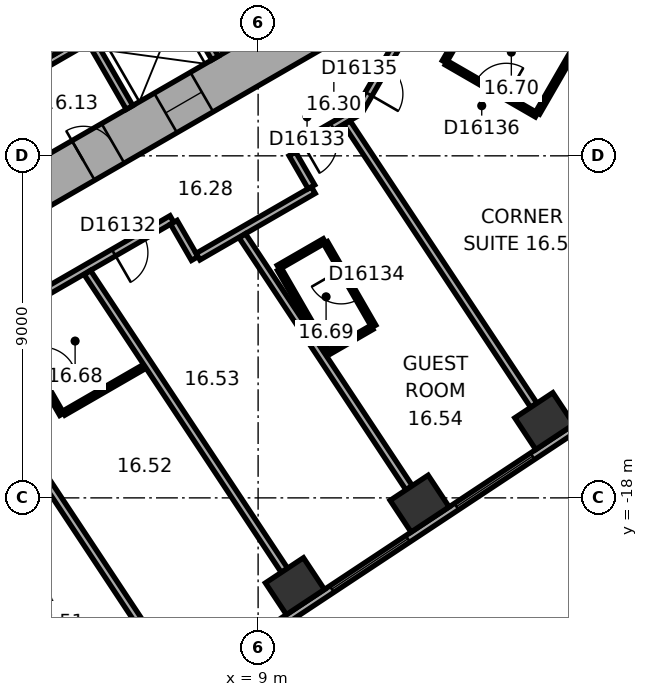
"""IFC4 building model, lengths in metres.
Left out: names, types, materials, properties, quantities, classifications, styles, units other than length and angle.
Written with IfcOpenShell. Run it as: python <this file> out.ifc"""

import sys

from ifc_helpers import new_model, si_unit, direction, frame, frame_2d, origin, origin_2d, place, context, subcontext, project, spatial, rectangle, extrude, element, fill, save


model = new_model("IFC4")
c1 = context("Model", 3, precision=1e-05, world=origin(), true_north=direction((0.0, 1.0)))
c2 = subcontext(c1, "Body", "Model", "MODEL_VIEW")
j1 = project(units=[si_unit("LENGTHUNIT", "METRE"), si_unit("PLANEANGLEUNIT", "RADIAN")], contexts=[c1])
p1 = place(None, origin())
s1 = spatial("IfcSite", under=j1, at=p1, CompositionType="ELEMENT")
p2 = place(p1, origin())
s2 = spatial("IfcBuilding", under=s1, at=p2, CompositionType="ELEMENT")
p3 = place(p2, frame((0.0, 0.0, 73.7)))
s3 = spatial("IfcBuildingStorey", under=s2, at=p3, CompositionType="ELEMENT", Elevation=73.7)
for number, where, z_axis, x_axis in (
    (1, (9.969, -20.324, 0.0), (0.0, 0.0, 1.0), (0.834, 0.552, 0.0)),
    (2, (13.25, -18.152, 0.0), (0.0, 0.0, 1.0), (0.834, 0.552, 0.0)),
    (3, (16.531, -15.981, 0.0), (0.0, 0.0, 1.0), (0.834, 0.552, 0.0)),
):
    element("IfcColumn", number, at=place(p3, frame(where, z_axis=z_axis, x_axis=x_axis)), inside=s3, PredefinedType="COLUMN", context=c2, shape_type="SweptSolid", body=[
        extrude(rectangle(XDim=1.2, YDim=1.0, at=origin_2d()), origin(), (0.0, 0.0, 1.0), 3.3),
    ])
p4 = place(p3, frame((-0.3, -11.836, 0.0), z_axis=(0.0, 0.0, 1.0), x_axis=(0.866021384402, 0.500006961711, 0.0)))
e4 = element("IfcWall", 4, at=p4, inside=s3, PredefinedType="SHEAR", context=c2, shape_type="SweptSolid", body=[
    extrude(rectangle(XDim=12.355, YDim=1.2, at=frame_2d((6.178, 0.0))), origin(), (0.0, 0.0, 1.0), 3.3),
])
p5 = place(p4, frame((2.828, 0.0, 0.0)))
e5 = element("IfcOpeningElement", 5, at=p5, cuts=e4, PredefinedType="OPENING", context=c2, shape_type="SweptSolid", body=[
    extrude(rectangle(XDim=0.9, YDim=2.1, at=frame_2d((0.45, 1.05))), frame((0.0, 0.61, 0.0), z_axis=(0.0, -1.0, 0.0), x_axis=(1.0, 0.0, 0.0)), (0.0, 0.0, 1.0), 1.22),
])
p6 = place(p4, frame((5.428, 0.0, 0.0)))
e6 = element("IfcOpeningElement", 6, at=p6, cuts=e4, PredefinedType="OPENING", context=c2, shape_type="SweptSolid", body=[
    extrude(rectangle(XDim=0.9, YDim=2.1, at=frame_2d((0.45, 1.05))), frame((0.0, 0.61, 0.0), z_axis=(0.0, -1.0, 0.0), x_axis=(1.0, 0.0, 0.0)), (0.0, 0.0, 1.0), 1.22),
])
p7 = place(p4, frame((7.928, 0.0, 0.0)))
e7 = element("IfcOpeningElement", 7, at=p7, cuts=e4, PredefinedType="OPENING", context=c2, shape_type="SweptSolid", body=[
    extrude(rectangle(XDim=1.1, YDim=2.1, at=frame_2d((0.55, 1.05))), frame((0.0, 0.61, 0.0), z_axis=(0.0, -1.0, 0.0), x_axis=(1.0, 0.0, 0.0)), (0.0, 0.0, 1.0), 1.22),
])
p8 = place(p3, frame((3.083, -25.601, 0.0), z_axis=(0.0, 0.0, 1.0), x_axis=(0.833884295743, 0.551939291329, 0.0)))
e8 = element("IfcWall", 8, at=p8, inside=s3, PredefinedType="STANDARD", context=c2, shape_type="SweptSolid", body=[
    extrude(rectangle(XDim=21.246, YDim=0.2, at=frame_2d((10.623, 0.0))), origin(), (0.0, 0.0, 1.0), 3.3),
])
p9 = place(p8, frame((1.553, 0.0, 0.8)))
e9 = element("IfcOpeningElement", 9, at=p9, cuts=e8, PredefinedType="OPENING", context=c2, shape_type="SweptSolid", body=[
    extrude(rectangle(XDim=2.4, YDim=1.7, at=frame_2d((1.2, 0.85))), frame((0.0, 0.11, 0.0), z_axis=(0.0, -1.0, 0.0), x_axis=(1.0, 0.0, 0.0)), (0.0, 0.0, 1.0), 0.22),
])
p10 = place(p8, frame((5.488, 0.0, 0.8)))
e10 = element("IfcOpeningElement", 10, at=p10, cuts=e8, PredefinedType="OPENING", context=c2, shape_type="SweptSolid", body=[
    extrude(rectangle(XDim=2.4, YDim=1.7, at=frame_2d((1.2, 0.85))), frame((0.0, 0.11, 0.0), z_axis=(0.0, -1.0, 0.0), x_axis=(1.0, 0.0, 0.0)), (0.0, 0.0, 1.0), 0.22),
])
p11 = place(p8, frame((9.422, 0.0, 0.8)))
e11 = element("IfcOpeningElement", 11, at=p11, cuts=e8, PredefinedType="OPENING", context=c2, shape_type="SweptSolid", body=[
    extrude(rectangle(XDim=2.4, YDim=1.7, at=frame_2d((1.2, 0.85))), frame((0.0, 0.11, 0.0), z_axis=(0.0, -1.0, 0.0), x_axis=(1.0, 0.0, 0.0)), (0.0, 0.0, 1.0), 0.22),
])
p12 = place(p8, frame((13.357, 0.0, 0.8)))
e12 = element("IfcOpeningElement", 12, at=p12, cuts=e8, PredefinedType="OPENING", context=c2, shape_type="SweptSolid", body=[
    extrude(rectangle(XDim=2.4, YDim=1.7, at=frame_2d((1.2, 0.85))), frame((0.0, 0.11, 0.0), z_axis=(0.0, -1.0, 0.0), x_axis=(1.0, 0.0, 0.0)), (0.0, 0.0, 1.0), 0.22),
])
p13 = place(p8, frame((17.291, 0.0, 0.8)))
e13 = element("IfcOpeningElement", 13, at=p13, cuts=e8, PredefinedType="OPENING", context=c2, shape_type="SweptSolid", body=[
    extrude(rectangle(XDim=2.4, YDim=1.7, at=frame_2d((1.2, 0.85))), frame((0.0, 0.11, 0.0), z_axis=(0.0, -1.0, 0.0), x_axis=(1.0, 0.0, 0.0)), (0.0, 0.0, 1.0), 0.22),
])
p14 = place(p3, frame((-0.024, -8.559, 0.0), z_axis=(0.0, 0.0, 1.0), x_axis=(0.866026010844, 0.49999894854, 0.0)))
e14 = element("IfcWall", 14, at=p14, inside=s3, PredefinedType="PARTITIONING", context=c2, shape_type="SweptSolid", body=[
    extrude(rectangle(XDim=8.0, YDim=0.2, at=frame_2d((4.0, 0.0))), origin(), (0.0, 0.0, 1.0), 2.95),
])
for number, where, z_axis, x_axis in (
    (15, (4.516, -5.822, 0.0), (0.0, 0.0, 1.0), (0.5, -0.866, 0.0)),
    (16, (6.768, -4.522, 0.0), (0.0, 0.0, 1.0), (0.5, -0.866, 0.0)),
):
    element("IfcWall", number, at=place(p3, frame(where, z_axis=z_axis, x_axis=x_axis)), inside=s3, PredefinedType="PARTITIONING", context=c2, shape_type="SweptSolid", body=[
        extrude(rectangle(XDim=2.2, YDim=0.2, at=frame_2d((1.1, 0.0))), origin(), (0.0, 0.0, 1.0), 2.95),
    ])
p15 = place(p3, frame((0.847, -7.767, 0.0), z_axis=(0.0, 0.0, 1.0), x_axis=(0.866027801685, 0.499995846692, 0.0)))
e17 = element("IfcWall", 17, at=p15, inside=s3, PredefinedType="SHEAR", context=c2, shape_type="SweptSolid", body=[
    extrude(rectangle(XDim=7.06, YDim=0.3, at=frame_2d((3.53, 0.0))), origin(), (0.0, 0.0, 1.0), 2.95),
])
p16 = place(p3, frame((1.033, -13.953, 0.0), z_axis=(0.0, 0.0, 1.0), x_axis=(0.866017531406, 0.500013635111, 0.0)))
e18 = element("IfcWall", 18, at=p16, inside=s3, PredefinedType="PARTITIONING", context=c2, shape_type="SweptSolid", body=[
    extrude(rectangle(XDim=6.58, YDim=0.2, at=frame_2d((3.29, 0.0))), origin(), (0.0, 0.0, 1.0), 2.95),
])
p17 = place(p16, frame((0.275, 0.0, 0.0)))
e19 = element("IfcOpeningElement", 19, at=p17, cuts=e18, PredefinedType="OPENING", context=c2, shape_type="SweptSolid", body=[
    extrude(rectangle(XDim=0.9, YDim=2.1, at=frame_2d((0.45, 1.05))), frame((0.0, 0.11, 0.0), z_axis=(0.0, -1.0, 0.0), x_axis=(1.0, 0.0, 0.0)), (0.0, 0.0, 1.0), 0.22),
])
p18 = place(p16, frame((4.811, 0.0, 0.0)))
e20 = element("IfcOpeningElement", 20, at=p18, cuts=e18, PredefinedType="OPENING", context=c2, shape_type="SweptSolid", body=[
    extrude(rectangle(XDim=0.9, YDim=2.1, at=frame_2d((0.45, 1.05))), frame((0.0, 0.11, 0.0), z_axis=(0.0, -1.0, 0.0), x_axis=(1.0, 0.0, 0.0)), (0.0, 0.0, 1.0), 0.22),
])
p19 = place(p3, frame((3.833, -15.801, 0.0), z_axis=(0.0, 0.0, 1.0), x_axis=(-0.500023687443, 0.866011727401, 0.0)))
e21 = element("IfcWall", 21, at=p19, inside=s3, PredefinedType="PARTITIONING", context=c2, shape_type="SweptSolid", body=[
    extrude(rectangle(XDim=2.9, YDim=0.12, at=frame_2d((1.45, 0.0))), origin(), (0.0, 0.0, 1.0), 2.95),
])
p20 = place(p19, frame((1.0, 0.0, 0.0)))
e22 = element("IfcOpeningElement", 22, at=p20, cuts=e21, PredefinedType="OPENING", context=c2, shape_type="SweptSolid", body=[
    extrude(rectangle(XDim=0.9, YDim=2.1, at=frame_2d((0.45, 1.05))), frame((0.0, 0.07, 0.0), z_axis=(0.0, -1.0, 0.0), x_axis=(1.0, 0.0, 0.0)), (0.0, 0.0, 1.0), 0.14),
])
p21 = place(p3, frame((6.02, -14.538, 0.0), z_axis=(0.0, 0.0, 1.0), x_axis=(-0.866022320763, -0.500005339912, 0.0)))
e23 = element("IfcWall", 23, at=p21, inside=s3, PredefinedType="PARTITIONING", context=c2, shape_type="SweptSolid", body=[
    extrude(rectangle(XDim=2.465, YDim=0.12, at=frame_2d((1.233, 0.0))), origin(), (0.0, 0.0, 1.0), 2.95),
])
p22 = place(p3, frame((6.412, -22.079, 0.0), z_axis=(0.0, 0.0, 1.0), x_axis=(-0.551919507115, 0.83389739037, 0.0)))
e24 = element("IfcWall", 24, at=p22, inside=s3, PredefinedType="PARTITIONING", context=c2, shape_type="SweptSolid", body=[
    extrude(rectangle(XDim=9.635, YDim=0.2, at=frame_2d((4.817, 0.0))), origin(), (0.0, 0.0, 1.0), 2.95),
])
p23 = place(p3, frame((6.782, -10.749, 0.0), z_axis=(0.0, 0.0, 1.0), x_axis=(0.500074377092, -0.865982457891, 0.0)))
e25 = element("IfcWall", 25, at=p23, inside=s3, PredefinedType="PARTITIONING", context=c2, shape_type="SweptSolid", body=[
    extrude(rectangle(XDim=1.101, YDim=0.2, at=frame_2d((0.55, 0.0))), origin(), (0.0, 0.0, 1.0), 2.95),
])
p24 = place(p3, frame((7.419, -11.653, 0.0), z_axis=(0.0, 0.0, 1.0), x_axis=(0.866038154057, 0.49997791523, 0.0)))
e26 = element("IfcWall", 26, at=p24, inside=s3, PredefinedType="PARTITIONING", context=c2, shape_type="SweptSolid", body=[
    extrude(rectangle(XDim=3.502, YDim=0.2, at=frame_2d((1.751, 0.0))), origin(), (0.0, 0.0, 1.0), 2.95),
])
p25 = place(p3, frame((9.532, -11.934, 0.0), z_axis=(0.0, 0.0, 1.0), x_axis=(0.866034573852, 0.49998411664, 0.0)))
e27 = element("IfcWall", 27, at=p25, inside=s3, PredefinedType="PARTITIONING", context=c2, shape_type="SweptSolid", body=[
    extrude(rectangle(XDim=1.4, YDim=0.12, at=frame_2d((0.7, 0.0))), origin(), (0.0, 0.0, 1.0), 2.95),
])
p26 = place(p3, frame((9.693, -19.907, 0.0), z_axis=(0.0, 0.0, 1.0), x_axis=(-0.551938394837, 0.833884889121, 0.0)))
e28 = element("IfcWall", 28, at=p26, inside=s3, PredefinedType="PARTITIONING", context=c2, shape_type="SweptSolid", body=[
    extrude(rectangle(XDim=9.394, YDim=0.2, at=frame_2d((4.697, 0.0))), origin(), (0.0, 0.0, 1.0), 2.15),
])
p27 = place(p3, frame((9.852, -8.861, 0.0), z_axis=(0.0, 0.0, 1.0), x_axis=(0.866013291437, 0.500020978615, 0.0)))
e29 = element("IfcWall", 29, at=p27, inside=s3, PredefinedType="PARTITIONING", context=c2, shape_type="SweptSolid", body=[
    extrude(rectangle(XDim=2.077, YDim=0.2, at=frame_2d((1.038, 0.0))), origin(), (0.0, 0.0, 1.0), 2.95),
])
p28 = place(p27, frame((0.372, 0.0, 0.0)))
e30 = element("IfcOpeningElement", 30, at=p28, cuts=e29, PredefinedType="OPENING", context=c2, shape_type="SweptSolid", body=[
    extrude(rectangle(XDim=0.9, YDim=2.1, at=frame_2d((0.45, 1.05))), frame((0.0, 0.11, 0.0), z_axis=(0.0, -1.0, 0.0), x_axis=(1.0, 0.0, 0.0)), (0.0, 0.0, 1.0), 0.22),
])
p29 = place(p3, frame((10.402, -9.815, 0.0), z_axis=(0.0, 0.0, 1.0), x_axis=(-0.499968756647, 0.866043441391, 0.0)))
e31 = element("IfcWall", 31, at=p29, inside=s3, PredefinedType="PARTITIONING", context=c2, shape_type="SweptSolid", body=[
    extrude(rectangle(XDim=1.001, YDim=0.2, at=frame_2d((0.5, 0.0))), origin(), (0.0, 0.0, 1.0), 2.95),
])
p30 = place(p3, frame((10.775, -11.286, 0.0), z_axis=(0.0, 0.0, 1.0), x_axis=(0.500046963369, -0.865998287773, 0.0)))
e32 = element("IfcWall", 32, at=p30, inside=s3, PredefinedType="PARTITIONING", context=c2, shape_type="SweptSolid", body=[
    extrude(rectangle(XDim=2.54, YDim=0.12, at=frame_2d((1.27, 0.0))), origin(), (0.0, 0.0, 1.0), 2.95),
])
p31 = place(p30, frame((0.82, 0.0, 0.0)))
e33 = element("IfcOpeningElement", 33, at=p31, cuts=e32, PredefinedType="OPENING", context=c2, shape_type="SweptSolid", body=[
    extrude(rectangle(XDim=0.9, YDim=2.1, at=frame_2d((0.45, 1.05))), frame((0.0, 0.07, 0.0), z_axis=(0.0, -1.0, 0.0), x_axis=(1.0, 0.0, 0.0)), (0.0, 0.0, 1.0), 0.14),
])
p32 = place(p3, frame((10.833, -14.185, 0.0), z_axis=(0.0, 0.0, 1.0), x_axis=(-0.500005339912, 0.866022320763, 0.0)))
e34 = element("IfcWall", 34, at=p32, inside=s3, PredefinedType="PARTITIONING", context=c2, shape_type="SweptSolid", body=[
    extrude(rectangle(XDim=2.54, YDim=0.12, at=frame_2d((1.27, 0.0))), origin(), (0.0, 0.0, 1.0), 2.95),
])
p33 = place(p3, frame((11.67, -7.788, 0.0), z_axis=(0.0, 0.0, 1.0), x_axis=(0.500063286585, 0.865988862174, 0.0)))
e35 = element("IfcWall", 35, at=p33, inside=s3, PredefinedType="PARTITIONING", context=c2, shape_type="SweptSolid", body=[
    extrude(rectangle(XDim=1.86, YDim=0.2, at=frame_2d((0.93, 0.0))), origin(), (0.0, 0.0, 1.0), 2.95),
])
p34 = place(p33, frame((0.48, 0.0, 0.0)))
e36 = element("IfcOpeningElement", 36, at=p34, cuts=e35, PredefinedType="OPENING", context=c2, shape_type="SweptSolid", body=[
    extrude(rectangle(XDim=0.9, YDim=2.1, at=frame_2d((0.45, 1.05))), frame((0.0, 0.11, 0.0), z_axis=(0.0, -1.0, 0.0), x_axis=(1.0, 0.0, 0.0)), (0.0, 0.0, 1.0), 0.22),
])
p35 = place(p3, frame((11.993, -13.515, 0.0), z_axis=(0.0, 0.0, 1.0), x_axis=(-0.865956862152, -0.500118698802, 0.0)))
e37 = element("IfcWall", 37, at=p35, inside=s3, PredefinedType="PARTITIONING", context=c2, shape_type="SweptSolid", body=[
    extrude(rectangle(XDim=1.28, YDim=0.12, at=frame_2d((0.64, 0.0))), origin(), (0.0, 0.0, 1.0), 2.95),
])
p36 = place(p3, frame((12.974, -17.735, 0.0), z_axis=(0.0, 0.0, 1.0), x_axis=(-0.55192625685, 0.833892922982, 0.0)))
e38 = element("IfcWall", 38, at=p36, inside=s3, PredefinedType="PARTITIONING", context=c2, shape_type="SweptSolid", body=[
    extrude(rectangle(XDim=7.95, YDim=0.2, at=frame_2d((3.975, 0.0))), origin(), (0.0, 0.0, 1.0), 2.95),
])
p37 = place(p3, frame((13.901, -6.524, 0.0), z_axis=(0.0, 0.0, 1.0), x_axis=(0.499964162598, 0.86604609353, 0.0)))
e39 = element("IfcWall", 39, at=p37, inside=s3, PredefinedType="PARTITIONING", context=c2, shape_type="SweptSolid", body=[
    extrude(rectangle(XDim=1.661, YDim=0.12, at=frame_2d((0.831, 0.0))), origin(), (0.0, 0.0, 1.0), 2.95),
])
p38 = place(p3, frame((16.255, -15.564, 0.0), z_axis=(0.0, 0.0, 1.0), x_axis=(-0.55192208744, 0.833895682562, 0.0)))
e40 = element("IfcWall", 40, at=p38, inside=s3, PredefinedType="PARTITIONING", context=c2, shape_type="SweptSolid", body=[
    extrude(rectangle(XDim=8.913, YDim=0.2, at=frame_2d((4.457, 0.0))), origin(), (0.0, 0.0, 1.0), 2.15),
])
p39 = place(p3, frame((16.326, -7.925, 0.0), z_axis=(0.0, 0.0, 1.0), x_axis=(-0.865997131366, 0.500048966069, 0.0)))
e41 = element("IfcWall", 41, at=p39, inside=s3, PredefinedType="PARTITIONING", context=c2, shape_type="SweptSolid", body=[
    extrude(rectangle(XDim=2.74, YDim=0.12, at=frame_2d((1.37, 0.0))), origin(), (0.0, 0.0, 1.0), 2.95),
])
p40 = place(p39, frame((0.92, 0.0, 0.0)))
e42 = element("IfcOpeningElement", 42, at=p40, cuts=e41, PredefinedType="OPENING", context=c2, shape_type="SweptSolid", body=[
    extrude(rectangle(XDim=0.9, YDim=2.1, at=frame_2d((0.45, 1.05))), frame((0.0, 0.07, 0.0), z_axis=(0.0, -1.0, 0.0), x_axis=(1.0, 0.0, 0.0)), (0.0, 0.0, 1.0), 0.14),
])
p41 = place(p3, frame((17.396, -6.071, 0.0), z_axis=(0.0, 0.0, 1.0), x_axis=(-0.500027264788, -0.866009661879, 0.0)))
e43 = element("IfcWall", 43, at=p41, inside=s3, PredefinedType="PARTITIONING", context=c2, shape_type="SweptSolid", body=[
    extrude(rectangle(XDim=2.08, YDim=0.12, at=frame_2d((1.04, 0.0))), origin(), (0.0, 0.0, 1.0), 2.95),
])
p42 = place(p11, origin())
e44 = element("IfcWindow", 44, at=p42, inside=s3, PartitioningType="SINGLE_PANEL", PredefinedType="WINDOW", context=c2, shape_type="SweptSolid", body=[
    extrude(rectangle(XDim=2.4, YDim=1.7, at=frame_2d((1.2, 0.85))), frame((0.0, 0.03, 0.0), z_axis=(0.0, -1.0, 0.0), x_axis=(1.0, 0.0, 0.0)), (0.0, 0.0, 1.0), 0.06),
])
fill(e11, e44)
p43 = place(p12, origin())
e45 = element("IfcWindow", 45, at=p43, inside=s3, PartitioningType="SINGLE_PANEL", PredefinedType="WINDOW", context=c2, shape_type="SweptSolid", body=[
    extrude(rectangle(XDim=2.4, YDim=1.7, at=frame_2d((1.2, 0.85))), frame((0.0, 0.03, 0.0), z_axis=(0.0, -1.0, 0.0), x_axis=(1.0, 0.0, 0.0)), (0.0, 0.0, 1.0), 0.06),
])
fill(e12, e45)
p44 = place(p6, origin())
e46 = element("IfcDoor", 46, at=p44, inside=s3, OperationType="SINGLE_SWING_LEFT", PredefinedType="DOOR", context=c2, shape_type="SweptSolid", body=[
    extrude(rectangle(XDim=0.9, YDim=2.1, at=frame_2d((0.45, 1.05))), frame((0.0, 0.025, 0.0), z_axis=(0.0, -1.0, 0.0), x_axis=(1.0, 0.0, 0.0)), (0.0, 0.0, 1.0), 0.05),
])
fill(e6, e46)
p45 = place(p7, origin())
e47 = element("IfcDoor", 47, at=p45, inside=s3, OperationType="DOUBLE_DOOR_SLIDING", PredefinedType="DOOR", context=c2, shape_type="SweptSolid", body=[
    extrude(rectangle(XDim=1.1, YDim=2.1, at=frame_2d((0.55, 1.05))), frame((0.0, 0.025, 0.0), z_axis=(0.0, -1.0, 0.0), x_axis=(1.0, 0.0, 0.0)), (0.0, 0.0, 1.0), 0.05),
])
fill(e7, e47)
p46 = place(p18, origin())
e48 = element("IfcDoor", 48, at=p46, inside=s3, OperationType="SINGLE_SWING_LEFT", PredefinedType="DOOR", context=c2, shape_type="SweptSolid", body=[
    extrude(rectangle(XDim=0.9, YDim=2.1, at=frame_2d((0.45, 1.05))), frame((0.0, 0.025, 0.0), z_axis=(0.0, -1.0, 0.0), x_axis=(1.0, 0.0, 0.0)), (0.0, 0.0, 1.0), 0.05),
])
fill(e20, e48)
p47 = place(p28, origin())
e49 = element("IfcDoor", 49, at=p47, inside=s3, OperationType="SINGLE_SWING_LEFT", PredefinedType="DOOR", context=c2, shape_type="SweptSolid", body=[
    extrude(rectangle(XDim=0.9, YDim=2.1, at=frame_2d((0.45, 1.05))), frame((0.0, 0.025, 0.0), z_axis=(0.0, -1.0, 0.0), x_axis=(1.0, 0.0, 0.0)), (0.0, 0.0, 1.0), 0.05),
])
fill(e30, e49)
p48 = place(p31, origin())
e50 = element("IfcDoor", 50, at=p48, inside=s3, OperationType="SINGLE_SWING_LEFT", PredefinedType="DOOR", context=c2, shape_type="SweptSolid", body=[
    extrude(rectangle(XDim=0.9, YDim=2.1, at=frame_2d((0.45, 1.05))), frame((0.0, 0.025, 0.0), z_axis=(0.0, -1.0, 0.0), x_axis=(1.0, 0.0, 0.0)), (0.0, 0.0, 1.0), 0.05),
])
fill(e33, e50)
p49 = place(p34, origin())
e51 = element("IfcDoor", 51, at=p49, inside=s3, OperationType="SINGLE_SWING_LEFT", PredefinedType="DOOR", context=c2, shape_type="SweptSolid", body=[
    extrude(rectangle(XDim=0.9, YDim=2.1, at=frame_2d((0.45, 1.05))), frame((0.0, 0.025, 0.0), z_axis=(0.0, -1.0, 0.0), x_axis=(1.0, 0.0, 0.0)), (0.0, 0.0, 1.0), 0.05),
])
fill(e36, e51)
p50 = place(p40, origin())
e52 = element("IfcDoor", 52, at=p50, inside=s3, OperationType="SINGLE_SWING_LEFT", PredefinedType="DOOR", context=c2, shape_type="SweptSolid", body=[
    extrude(rectangle(XDim=0.9, YDim=2.1, at=frame_2d((0.45, 1.05))), frame((0.0, 0.025, 0.0), z_axis=(0.0, -1.0, 0.0), x_axis=(1.0, 0.0, 0.0)), (0.0, 0.0, 1.0), 0.05),
])
fill(e42, e52)
save(model, sys.argv[1])
